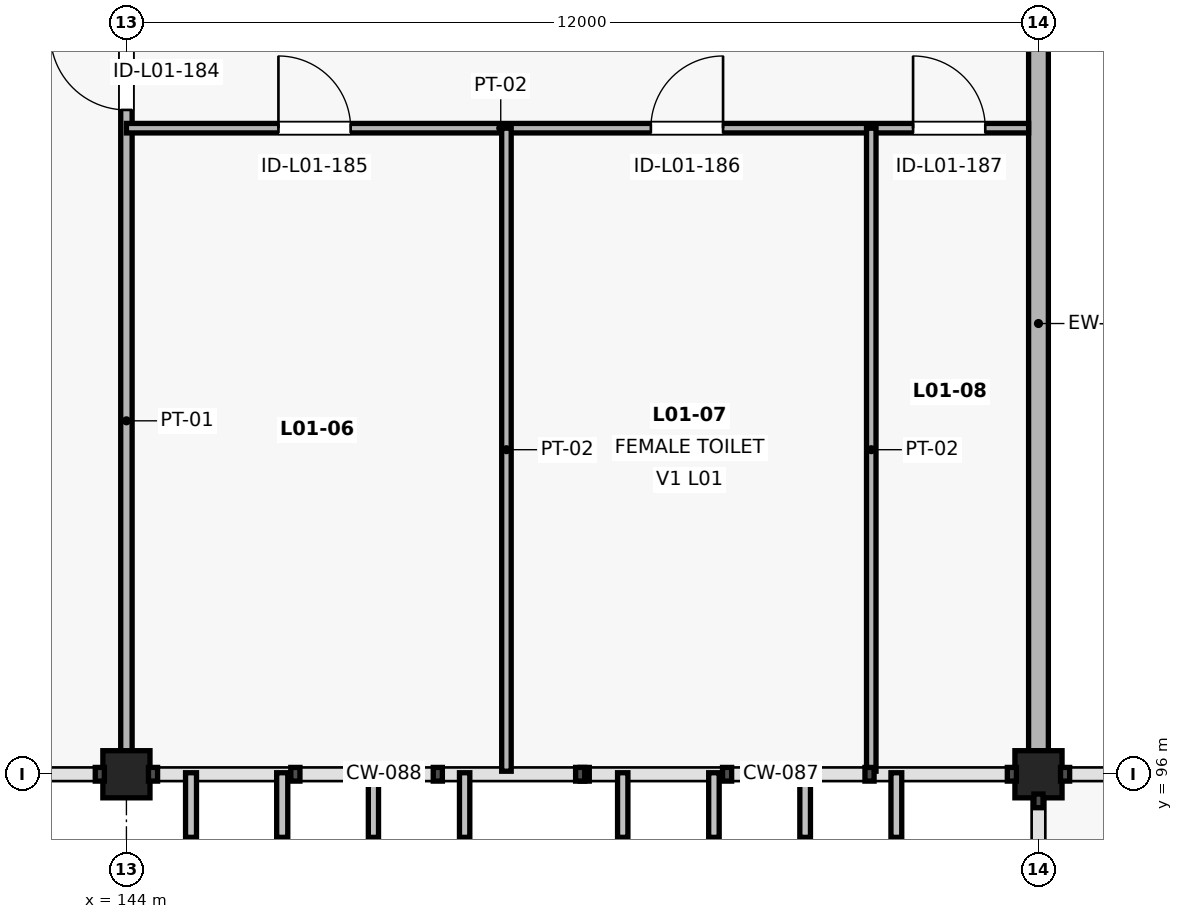
"""IFC4 building model, lengths in metres.
Left out: names, types, materials, properties, quantities, classifications, styles, units other than length and angle.
Written with IfcOpenShell. Run it as: python <this file> out.ifc"""

import sys

from ifc_helpers import new_model, si_unit, direction, frame, frame_2d, origin, origin_2d, place, context, subcontext, project, spatial, rectangle, extrude, element, fill, save


model = new_model("IFC4")
c1 = context("Model", 3, precision=1e-05, world=origin(), true_north=direction((0.0, 1.0)))
c2 = subcontext(c1, "Body", "Model", "MODEL_VIEW")
j1 = project(units=[si_unit("LENGTHUNIT", "METRE"), si_unit("PLANEANGLEUNIT", "RADIAN")], contexts=[c1])
p1 = place(None, origin())
s1 = spatial("IfcSite", under=j1, at=p1, CompositionType="ELEMENT")
p2 = place(p1, origin())
s2 = spatial("IfcBuilding", under=s1, at=p2, CompositionType="ELEMENT")
p3 = place(p2, frame((0.0, 0.0, 6.6)))
s3 = spatial("IfcBuildingStorey", under=s2, at=p3, CompositionType="ELEMENT", Elevation=6.6)
p4 = place(p3, frame((144.0, 96.0, 0.0), z_axis=(0.0, 0.0, 1.0), x_axis=(1.0, 0.0, 0.0)))
e1 = element("IfcColumn", 1, at=p4, inside=s3, PredefinedType="COLUMN", context=c2, shape_type="SweptSolid", body=[
    extrude(rectangle(XDim=0.62, YDim=0.62, at=origin_2d()), origin(), (0.0, 0.0, 1.0), 5.4),
])
p5 = place(p3, frame((156.0, 96.0, 0.0), z_axis=(0.0, 0.0, 1.0), x_axis=(1.0, 0.0, 0.0)))
e2 = element("IfcColumn", 2, at=p5, inside=s3, PredefinedType="COLUMN", context=c2, shape_type="SweptSolid", body=[
    extrude(rectangle(XDim=0.62, YDim=0.62, at=origin_2d()), origin(), (0.0, 0.0, 1.0), 4.8),
])
p6 = place(p3, frame((156.0, 107.55, 0.0), z_axis=(0.0, 0.0, 1.0), x_axis=(0.0, -1.0, 0.0)))
e3 = element("IfcWall", 3, at=p6, inside=s3, PredefinedType="SOLIDWALL", context=c2, shape_type="SweptSolid", body=[
    extrude(rectangle(XDim=11.24, YDim=0.26, at=frame_2d((5.62, 0.0))), origin(), (0.0, 0.0, 1.0), 3.518),
])
p7 = place(p3, frame((144.0, 96.04, 0.0), z_axis=(0.0, 0.0, 1.0), x_axis=(0.0, 1.0, 0.0)))
e4 = element("IfcWall", 4, at=p7, inside=s3, PredefinedType="PARTITIONING", context=c2, shape_type="SweptSolid", body=[
    extrude(rectangle(XDim=11.48, YDim=0.15, at=frame_2d((5.74, 0.0))), origin(), (0.0, 0.0, 1.0), 3.524),
])
p8 = place(p7, frame((8.7, 0.0, 0.0)))
e5 = element("IfcOpeningElement", 5, at=p8, cuts=e4, PredefinedType="OPENING", context=c2, shape_type="SweptSolid", body=[
    extrude(rectangle(XDim=1.0, YDim=2.2, at=frame_2d((0.5, 1.1))), frame((0.0, 0.09, 0.0), z_axis=(0.0, -1.0, 0.0), x_axis=(1.0, 0.0, 0.0)), (0.0, 0.0, 1.0), 0.18),
])
p9 = place(p3, frame((144.0, 104.5, 0.0), z_axis=(0.0, 0.0, 1.0), x_axis=(1.0, 0.0, 0.0)))
e6 = element("IfcWall", 6, at=p9, inside=s3, PredefinedType="PARTITIONING", context=c2, shape_type="SweptSolid", body=[
    extrude(rectangle(XDim=11.87, YDim=0.125, at=frame_2d((5.935, 0.0))), origin(), (0.0, 0.0, 1.0), 3.674),
])
p10 = place(p9, frame((2.0, 0.0, 0.0)))
e7 = element("IfcOpeningElement", 7, at=p10, cuts=e6, PredefinedType="OPENING", context=c2, shape_type="SweptSolid", body=[
    extrude(rectangle(XDim=0.95, YDim=2.1, at=frame_2d((0.475, 1.05))), frame((0.0, 0.077, 0.0), z_axis=(0.0, -1.0, 0.0), x_axis=(1.0, 0.0, 0.0)), (0.0, 0.0, 1.0), 0.155),
])
p11 = place(p9, frame((6.9, 0.0, 0.0)))
e8 = element("IfcOpeningElement", 8, at=p11, cuts=e6, PredefinedType="OPENING", context=c2, shape_type="SweptSolid", body=[
    extrude(rectangle(XDim=0.95, YDim=2.1, at=frame_2d((0.475, 1.05))), frame((0.0, 0.077, 0.0), z_axis=(0.0, -1.0, 0.0), x_axis=(1.0, 0.0, 0.0)), (0.0, 0.0, 1.0), 0.155),
])
p12 = place(p9, frame((10.35, 0.0, 0.0)))
e9 = element("IfcOpeningElement", 9, at=p12, cuts=e6, PredefinedType="OPENING", context=c2, shape_type="SweptSolid", body=[
    extrude(rectangle(XDim=0.95, YDim=2.1, at=frame_2d((0.475, 1.05))), frame((0.0, 0.077, 0.0), z_axis=(0.0, -1.0, 0.0), x_axis=(1.0, 0.0, 0.0)), (0.0, 0.0, 1.0), 0.155),
])
for number, where, z_axis, x_axis in (
    (10, (149.0, 96.04, 0.0), (0.0, 0.0, 1.0), (0.0, 1.0, 0.0)),
    (11, (153.8, 96.04, 0.0), (0.0, 0.0, 1.0), (0.0, 1.0, 0.0)),
):
    element("IfcWall", number, at=place(p3, frame(where, z_axis=z_axis, x_axis=x_axis)), inside=s3, PredefinedType="PARTITIONING", context=c2, shape_type="SweptSolid", body=[
        extrude(rectangle(XDim=8.46, YDim=0.125, at=frame_2d((4.23, 0.0))), origin(), (0.0, 0.0, 1.0), 3.524),
    ])
p13 = place(p8, origin())
e12 = element("IfcDoor", 12, at=p13, inside=s3, OperationType="SINGLE_SWING_RIGHT", PredefinedType="DOOR", context=c2, shape_type="SweptSolid", body=[
    extrude(rectangle(XDim=1.0, YDim=2.2, at=frame_2d((0.5, 1.1))), frame((0.0, 0.025, 0.0), z_axis=(0.0, -1.0, 0.0), x_axis=(1.0, 0.0, 0.0)), (0.0, 0.0, 1.0), 0.05),
])
fill(e5, e12)
p14 = place(p10, origin())
e13 = element("IfcDoor", 13, at=p14, inside=s3, OperationType="SINGLE_SWING_LEFT", PredefinedType="DOOR", context=c2, shape_type="SweptSolid", body=[
    extrude(rectangle(XDim=0.95, YDim=2.1, at=frame_2d((0.475, 1.05))), frame((0.0, 0.025, 0.0), z_axis=(0.0, -1.0, 0.0), x_axis=(1.0, 0.0, 0.0)), (0.0, 0.0, 1.0), 0.05),
])
fill(e7, e13)
p15 = place(p11, origin())
e14 = element("IfcDoor", 14, at=p15, inside=s3, OperationType="SINGLE_SWING_RIGHT", PredefinedType="DOOR", context=c2, shape_type="SweptSolid", body=[
    extrude(rectangle(XDim=0.95, YDim=2.1, at=frame_2d((0.475, 1.05))), frame((0.0, 0.025, 0.0), z_axis=(0.0, -1.0, 0.0), x_axis=(1.0, 0.0, 0.0)), (0.0, 0.0, 1.0), 0.05),
])
fill(e8, e14)
p16 = place(p12, origin())
e15 = element("IfcDoor", 15, at=p16, inside=s3, OperationType="SINGLE_SWING_LEFT", PredefinedType="DOOR", context=c2, shape_type="SweptSolid", body=[
    extrude(rectangle(XDim=0.95, YDim=2.1, at=frame_2d((0.475, 1.05))), frame((0.0, 0.025, 0.0), z_axis=(0.0, -1.0, 0.0), x_axis=(1.0, 0.0, 0.0)), (0.0, 0.0, 1.0), 0.05),
])
fill(e9, e15)
save(model, sys.argv[1])
